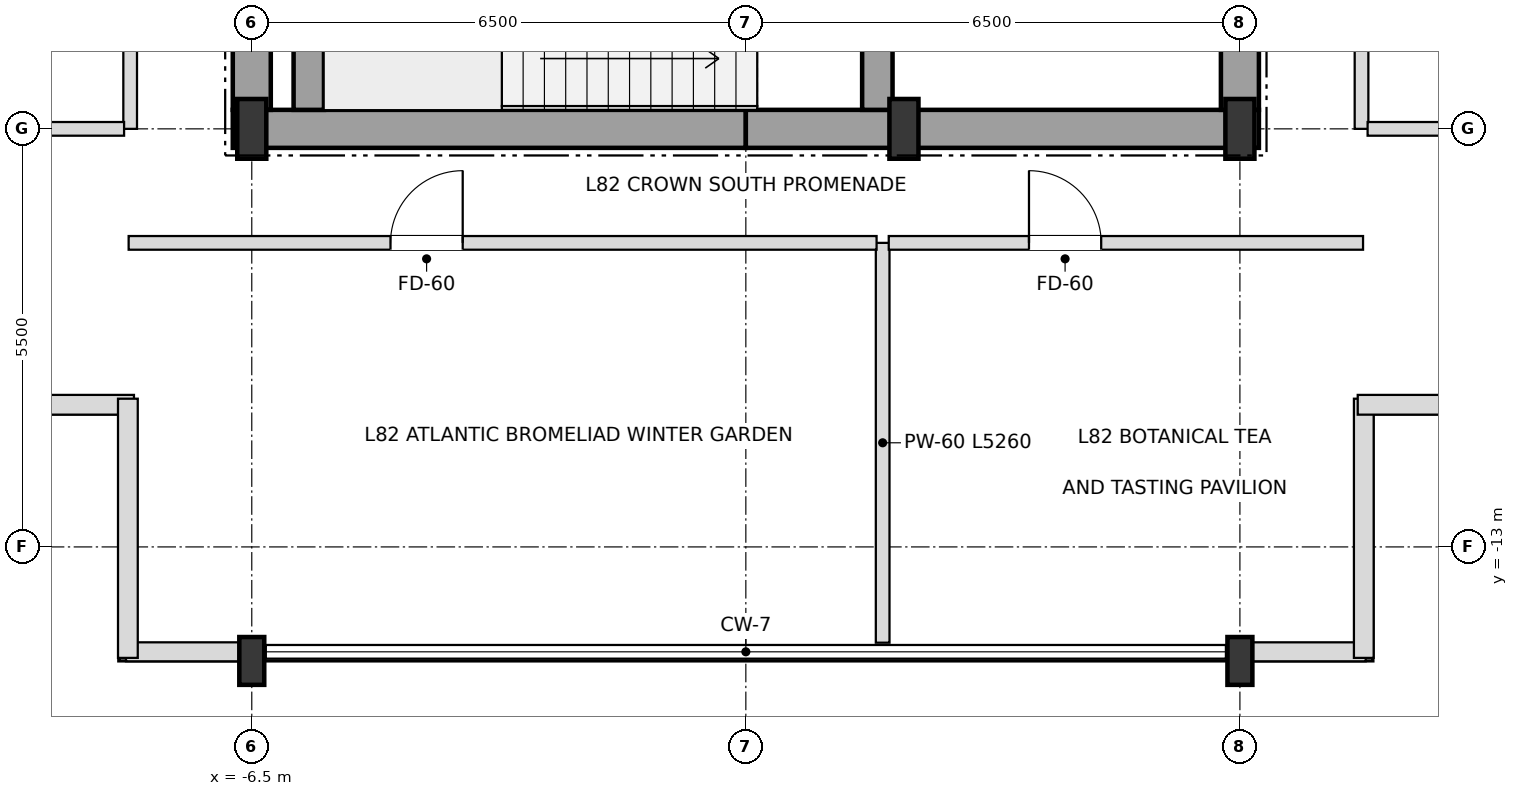
"""IFC4 building model, lengths in metres.
Left out: names, types, materials, properties, quantities, classifications, styles, units other than length and angle.
Written with IfcOpenShell. Run it as: python <this file> out.ifc"""

import sys

from ifc_helpers import new_model, si_unit, direction, frame, frame_2d, origin, origin_2d, place, context, subcontext, project, spatial, rectangle, i_section, extrude, element, fill, save


model = new_model("IFC4")
c1 = context("Model", 3, precision=1e-05, world=origin(), true_north=direction((0.0, 1.0)))
c2 = subcontext(c1, "Body", "Model", "MODEL_VIEW")
j1 = project(units=[si_unit("LENGTHUNIT", "METRE"), si_unit("PLANEANGLEUNIT", "RADIAN")], contexts=[c1])
p1 = place(None, origin())
s1 = spatial("IfcSite", under=j1, at=p1, CompositionType="ELEMENT")
p2 = place(p1, origin())
s2 = spatial("IfcBuilding", under=s1, at=p2, CompositionType="ELEMENT")
p3 = place(p2, frame((0.0, 0.0, 314.4)))
s3 = spatial("IfcBuildingStorey", under=s2, at=p3, CompositionType="ELEMENT", Elevation=314.4)
for number, where, z_axis, x_axis in (
    (1, (-6.5, -7.5, 0.0), (0.0, 0.0, 1.0), (1.0, 0.0, 0.0)),
    (2, (2.08, -7.5, 0.0), (0.0, 0.0, 1.0), (1.0, 0.0, 0.0)),
    (3, (6.5, -7.5, 0.0), (0.0, 0.0, 1.0), (1.0, 0.0, 0.0)),
):
    element("IfcColumn", number, at=place(p3, frame(where, z_axis=z_axis, x_axis=x_axis)), inside=s3, PredefinedType="COLUMN", context=c2, shape_type="SweptSolid", body=[
        extrude(i_section(OverallWidth=0.382, OverallDepth=0.786, WebThickness=0.02, FlangeThickness=0.033, at=origin_2d()), origin(), (0.0, 0.0, 1.0), 4.5),
    ])
for number, where, z_axis, x_axis in (
    (4, (-6.5, -14.5, 0.0), (0.0, 0.0, 1.0), (1.0, 0.0, 0.0)),
    (5, (6.5, -14.5, 0.0), (0.0, 0.0, 1.0), (1.0, 0.0, 0.0)),
):
    element("IfcColumn", number, at=place(p3, frame(where, z_axis=z_axis, x_axis=x_axis)), inside=s3, PredefinedType="COLUMN", context=c2, shape_type="SweptSolid", body=[
        extrude(i_section(OverallWidth=0.328, OverallDepth=0.629, WebThickness=0.014, FlangeThickness=0.021, at=origin_2d()), origin(), (0.0, 0.0, 1.0), 4.5),
    ])
for number, where, z_axis, x_axis in (
    (6, (-8.155, -14.38, 0.0), (0.0, 0.0, 1.0), (1.0, 0.0, 0.0)),
    (7, (6.659, -14.38, 0.0), (0.0, 0.0, 1.0), (1.0, 0.0, 0.0)),
):
    element("IfcWall", number, at=place(p3, frame(where, z_axis=z_axis, x_axis=x_axis)), inside=s3, PredefinedType="SOLIDWALL", context=c2, shape_type="SweptSolid", body=[
        extrude(rectangle(XDim=1.496, YDim=0.25, at=frame_2d((0.748, 0.0))), origin(), (0.0, 0.0, 1.0), 4.25),
    ])
for number, where, z_axis, x_axis in (
    (8, (-11.46, -11.13, 0.0), (0.0, 0.0, 1.0), (1.0, 0.0, 0.0)),
    (9, (-8.13, -11.05, 0.0), (0.0, 0.0, 1.0), (0.0, -1.0, 0.0)),
    (10, (8.13, -14.46, 0.0), (0.0, 0.0, 1.0), (0.0, 1.0, 0.0)),
    (11, (8.05, -11.13, 0.0), (0.0, 0.0, 1.0), (1.0, 0.0, 0.0)),
):
    element("IfcWall", number, at=place(p3, frame(where, z_axis=z_axis, x_axis=x_axis)), inside=s3, PredefinedType="SOLIDWALL", context=c2, shape_type="SweptSolid", body=[
        extrude(rectangle(XDim=3.41, YDim=0.26, at=frame_2d((1.705, 0.0))), origin(), (0.0, 0.0, 1.0), 4.25),
    ])
for number, where, z_axis, x_axis in (
    (12, (-6.75, -7.5, 0.0), (0.0, 0.0, 1.0), (1.0, 0.0, 0.0)),
    (13, (0.0, -7.5, 0.0), (0.0, 0.0, 1.0), (1.0, 0.0, 0.0)),
):
    element("IfcWall", number, at=place(p3, frame(where, z_axis=z_axis, x_axis=x_axis)), inside=s3, PredefinedType="SHEAR", context=c2, shape_type="SweptSolid", body=[
        extrude(rectangle(XDim=6.75, YDim=0.5, at=frame_2d((3.375, 0.0))), origin(), (0.0, 0.0, 1.0), 4.25),
    ])
p4 = place(p3, frame((-6.5, -7.25, 0.0), z_axis=(0.0, 0.0, 1.0), x_axis=(0.0, 1.0, 0.0)))
e14 = element("IfcWall", 14, at=p4, inside=s3, PredefinedType="SHEAR", context=c2, shape_type="SweptSolid", body=[
    extrude(rectangle(XDim=3.55, YDim=0.5, at=frame_2d((1.775, 0.0))), origin(), (0.0, 0.0, 1.0), 4.25),
])
p5 = place(p3, frame((6.5, -7.25, 0.0), z_axis=(0.0, 0.0, 1.0), x_axis=(0.0, 1.0, 0.0)))
e15 = element("IfcWall", 15, at=p5, inside=s3, PredefinedType="SHEAR", context=c2, shape_type="SweptSolid", body=[
    extrude(rectangle(XDim=5.75, YDim=0.5, at=frame_2d((2.875, 0.0))), origin(), (0.0, 0.0, 1.0), 4.25),
])
p6 = place(p5, frame((0.85, 0.0, 0.0)))
e16 = element("IfcOpeningElement", 16, at=p6, cuts=e15, PredefinedType="OPENING", context=c2, shape_type="SweptSolid", body=[
    extrude(rectangle(XDim=1.05, YDim=2.15, at=frame_2d((0.525, 1.075))), frame((0.0, 0.26, 0.0), z_axis=(0.0, -1.0, 0.0), x_axis=(1.0, 0.0, 0.0)), (0.0, 0.0, 1.0), 0.52),
])
p7 = place(p3, frame((-5.75, -7.25, 0.0), z_axis=(0.0, 0.0, 1.0), x_axis=(0.0, 1.0, 0.0)))
e17 = element("IfcWall", 17, at=p7, inside=s3, PredefinedType="SHEAR", context=c2, shape_type="SweptSolid", body=[
    extrude(rectangle(XDim=2.9, YDim=0.4, at=frame_2d((1.45, 0.0))), origin(), (0.0, 0.0, 1.0), 4.25),
])
p8 = place(p3, frame((1.73, -7.25, 0.0), z_axis=(0.0, 0.0, 1.0), x_axis=(0.0, 1.0, 0.0)))
e18 = element("IfcWall", 18, at=p8, inside=s3, PredefinedType="SHEAR", context=c2, shape_type="SweptSolid", body=[
    extrude(rectangle(XDim=3.3, YDim=0.4, at=frame_2d((1.65, 0.0))), origin(), (0.0, 0.0, 1.0), 4.25),
])
p9 = place(p8, frame((0.9, 0.0, 0.0)))
e19 = element("IfcOpeningElement", 19, at=p9, cuts=e18, PredefinedType="OPENING", context=c2, shape_type="SweptSolid", body=[
    extrude(rectangle(XDim=1.05, YDim=2.15, at=frame_2d((0.525, 1.075))), frame((0.0, 0.21, 0.0), z_axis=(0.0, -1.0, 0.0), x_axis=(1.0, 0.0, 0.0)), (0.0, 0.0, 1.0), 0.42),
])
p10 = place(p3, frame((-8.1, -7.5, 0.0), z_axis=(0.0, 0.0, 1.0), x_axis=(0.0, 1.0, 0.0)))
e20 = element("IfcWall", 20, at=p10, inside=s3, PredefinedType="PARTITIONING", context=c2, shape_type="SweptSolid", body=[
    extrude(rectangle(XDim=15.0, YDim=0.18, at=frame_2d((7.5, 0.0))), origin(), (0.0, 0.0, 1.0), 4.25),
])
p11 = place(p10, frame((4.525, 0.0, 0.0)))
e21 = element("IfcOpeningElement", 21, at=p11, cuts=e20, PredefinedType="OPENING", context=c2, shape_type="SweptSolid", body=[
    extrude(rectangle(XDim=0.95, YDim=2.15, at=frame_2d((0.475, 1.075))), frame((0.0, 0.1, 0.0), z_axis=(0.0, -1.0, 0.0), x_axis=(1.0, 0.0, 0.0)), (0.0, 0.0, 1.0), 0.2),
])
p12 = place(p3, frame((1.8, -14.26, 0.0), z_axis=(0.0, 0.0, 1.0), x_axis=(0.0, 1.0, 0.0)))
e22 = element("IfcWall", 22, at=p12, inside=s3, PredefinedType="PARTITIONING", context=c2, shape_type="SweptSolid", body=[
    extrude(rectangle(XDim=5.26, YDim=0.18, at=frame_2d((2.63, 0.0))), origin(), (0.0, 0.0, 1.0), 4.25),
])
p13 = place(p3, frame((8.1, -7.5, 0.0), z_axis=(0.0, 0.0, 1.0), x_axis=(0.0, 1.0, 0.0)))
e23 = element("IfcWall", 23, at=p13, inside=s3, PredefinedType="PARTITIONING", context=c2, shape_type="SweptSolid", body=[
    extrude(rectangle(XDim=15.0, YDim=0.18, at=frame_2d((7.5, 0.0))), origin(), (0.0, 0.0, 1.0), 4.25),
])
p14 = place(p13, frame((4.525, 0.0, 0.0)))
e24 = element("IfcOpeningElement", 24, at=p14, cuts=e23, PredefinedType="OPENING", context=c2, shape_type="SweptSolid", body=[
    extrude(rectangle(XDim=0.95, YDim=2.15, at=frame_2d((0.475, 1.075))), frame((0.0, 0.1, 0.0), z_axis=(0.0, -1.0, 0.0), x_axis=(1.0, 0.0, 0.0)), (0.0, 0.0, 1.0), 0.2),
])
p15 = place(p13, frame((11.825, 0.0, 0.0)))
e25 = element("IfcOpeningElement", 25, at=p15, cuts=e23, PredefinedType="OPENING", context=c2, shape_type="SweptSolid", body=[
    extrude(rectangle(XDim=0.95, YDim=2.15, at=frame_2d((0.475, 1.075))), frame((0.0, 0.1, 0.0), z_axis=(0.0, -1.0, 0.0), x_axis=(1.0, 0.0, 0.0)), (0.0, 0.0, 1.0), 0.2),
])
p16 = place(p3, frame((-8.12, -9.0, 0.0), z_axis=(0.0, 0.0, 1.0), x_axis=(1.0, 0.0, 0.0)))
e26 = element("IfcWall", 26, at=p16, inside=s3, PredefinedType="PARTITIONING", context=c2, shape_type="SweptSolid", body=[
    extrude(rectangle(XDim=9.84, YDim=0.18, at=frame_2d((4.92, 0.0))), origin(), (0.0, 0.0, 1.0), 4.25),
])
p17 = place(p16, frame((3.445, 0.0, 0.0)))
e27 = element("IfcOpeningElement", 27, at=p17, cuts=e26, PredefinedType="OPENING", context=c2, shape_type="SweptSolid", body=[
    extrude(rectangle(XDim=0.95, YDim=2.15, at=frame_2d((0.475, 1.075))), frame((0.0, 0.1, 0.0), z_axis=(0.0, -1.0, 0.0), x_axis=(1.0, 0.0, 0.0)), (0.0, 0.0, 1.0), 0.2),
])
p18 = place(p3, frame((1.88, -9.0, 0.0), z_axis=(0.0, 0.0, 1.0), x_axis=(1.0, 0.0, 0.0)))
e28 = element("IfcWall", 28, at=p18, inside=s3, PredefinedType="PARTITIONING", context=c2, shape_type="SweptSolid", body=[
    extrude(rectangle(XDim=6.24, YDim=0.18, at=frame_2d((3.12, 0.0))), origin(), (0.0, 0.0, 1.0), 4.25),
])
p19 = place(p18, frame((1.845, 0.0, 0.0)))
e29 = element("IfcOpeningElement", 29, at=p19, cuts=e28, PredefinedType="OPENING", context=c2, shape_type="SweptSolid", body=[
    extrude(rectangle(XDim=0.95, YDim=2.15, at=frame_2d((0.475, 1.075))), frame((0.0, 0.1, 0.0), z_axis=(0.0, -1.0, 0.0), x_axis=(1.0, 0.0, 0.0)), (0.0, 0.0, 1.0), 0.2),
])
for number, where, z_axis, x_axis in (
    (30, (-11.245, -7.5, 0.0), (0.0, 0.0, 1.0), (1.0, 0.0, 0.0)),
    (31, (8.18, -7.5, 0.0), (0.0, 0.0, 1.0), (1.0, 0.0, 0.0)),
):
    element("IfcWall", number, at=place(p3, frame(where, z_axis=z_axis, x_axis=x_axis)), inside=s3, PredefinedType="PARTITIONING", context=c2, shape_type="SweptSolid", body=[
        extrude(rectangle(XDim=3.065, YDim=0.18, at=frame_2d((1.533, 0.0))), origin(), (0.0, 0.0, 1.0), 3.918),
    ])
p20 = place(p17, origin())
e32 = element("IfcDoor", 32, at=p20, inside=s3, OperationType="SINGLE_SWING_RIGHT", PredefinedType="DOOR", context=c2, shape_type="SweptSolid", body=[
    extrude(rectangle(XDim=0.95, YDim=2.15, at=frame_2d((0.475, 1.075))), frame((0.0, 0.025, 0.0), z_axis=(0.0, -1.0, 0.0), x_axis=(1.0, 0.0, 0.0)), (0.0, 0.0, 1.0), 0.05),
])
fill(e27, e32)
p21 = place(p19, origin())
e33 = element("IfcDoor", 33, at=p21, inside=s3, OperationType="SINGLE_SWING_LEFT", PredefinedType="DOOR", context=c2, shape_type="SweptSolid", body=[
    extrude(rectangle(XDim=0.95, YDim=2.15, at=frame_2d((0.475, 1.075))), frame((0.0, 0.025, 0.0), z_axis=(0.0, -1.0, 0.0), x_axis=(1.0, 0.0, 0.0)), (0.0, 0.0, 1.0), 0.05),
])
fill(e29, e33)
save(model, sys.argv[1])
